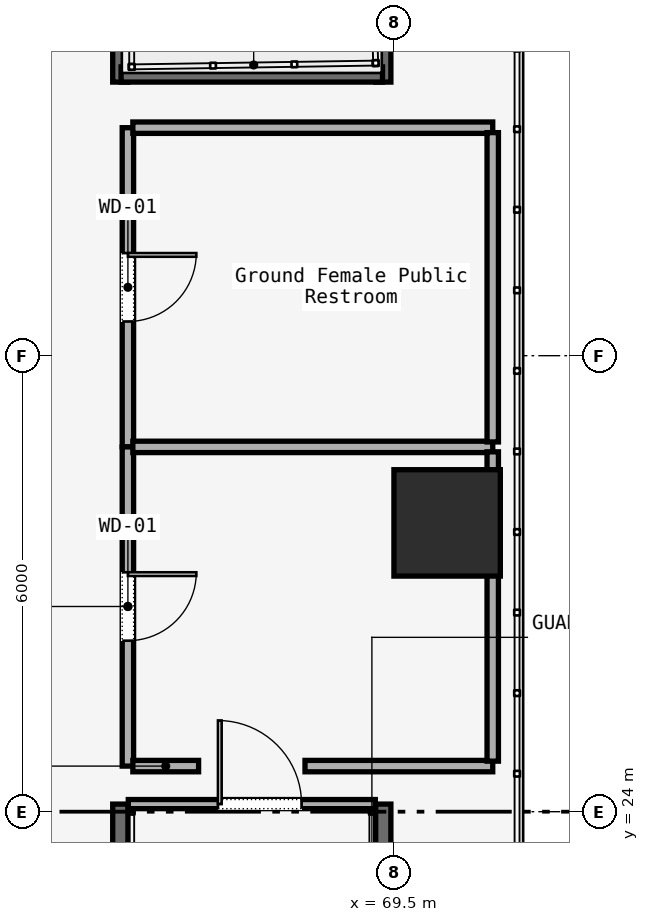
"""IFC4 building model, lengths in metres.
Left out: names, types, materials, properties, quantities, classifications, styles, units other than length and angle.
Written with IfcOpenShell. Run it as: python <this file> out.ifc"""

import sys

from ifc_helpers import new_model, si_unit, direction, frame, frame_2d, origin, origin_2d, place, context, subcontext, project, spatial, rectangle, extrude, element, fill, save


model = new_model("IFC4")
c1 = context("Model", 3, precision=1e-05, world=origin(), true_north=direction((0.0, 1.0)))
c2 = subcontext(c1, "Body", "Model", "MODEL_VIEW")
j1 = project(units=[si_unit("LENGTHUNIT", "METRE"), si_unit("PLANEANGLEUNIT", "RADIAN")], contexts=[c1])
p1 = place(None, origin())
s1 = spatial("IfcSite", under=j1, at=p1, CompositionType="ELEMENT")
p2 = place(p1, origin())
s2 = spatial("IfcBuilding", under=s1, at=p2, CompositionType="ELEMENT")
p3 = place(p2, origin())
s3 = spatial("IfcBuildingStorey", under=s2, at=p3, CompositionType="ELEMENT", Elevation=0.0)
p4 = place(p3, frame((70.2, 27.8, 0.0), z_axis=(0.0, 0.0, 1.0), x_axis=(1.0, 0.0, 0.0)))
e1 = element("IfcColumn", 1, at=p4, inside=s3, PredefinedType="COLUMN", context=c2, shape_type="SweptSolid", body=[
    extrude(rectangle(XDim=1.4, YDim=1.4, at=origin_2d()), origin(), (0.0, 0.0, 1.0), 5.7),
])
for number, where, z_axis, x_axis in (
    (2, (65.9, 24.1, -0.4), (0.0, 0.0, 1.0), (0.0, -1.0, 0.0)),
    (3, (69.36, 24.1, -0.4), (0.0, 0.0, 1.0), (0.0, -1.0, 0.0)),
):
    element("IfcWall", number, at=place(p3, frame(where, z_axis=z_axis, x_axis=x_axis)), inside=s3, PredefinedType="SOLIDWALL", context=c2, shape_type="SweptSolid", body=[
        extrude(rectangle(XDim=7.7, YDim=0.2, at=frame_2d((3.85, 0.0))), origin(), (0.0, 0.0, 1.0), 6.4),
    ])
p5 = place(p3, frame((66.005, 24.1, 0.0), z_axis=(0.0, 0.0, 1.0), x_axis=(1.0, 0.0, 0.0)))
e4 = element("IfcWall", 4, at=p5, inside=s3, PredefinedType="SOLIDWALL", context=c2, shape_type="SweptSolid", body=[
    extrude(rectangle(XDim=3.25, YDim=0.12, at=frame_2d((1.625, 0.0))), origin(), (0.0, 0.0, 1.0), 3.6),
])
p6 = place(p5, frame((1.18, 0.0, 0.0)))
e5 = element("IfcOpeningElement", 5, at=p6, cuts=e4, PredefinedType="OPENING", context=c2, shape_type="SweptSolid", body=[
    extrude(rectangle(XDim=1.1, YDim=2.2, at=frame_2d((0.55, 1.1))), frame((0.0, 0.06, 0.0), z_axis=(0.0, -1.0, 0.0), x_axis=(1.0, 0.0, 0.0)), (0.0, 0.0, 1.0), 0.12),
])
for number, where, z_axis, x_axis in (
    (6, (65.9, 41.3, -0.4), (0.0, 0.0, 1.0), (0.0, -1.0, 0.0)),
    (7, (69.36, 41.3, -0.4), (0.0, 0.0, 1.0), (0.0, -1.0, 0.0)),
):
    element("IfcWall", number, at=place(p3, frame(where, z_axis=z_axis, x_axis=x_axis)), inside=s3, PredefinedType="SOLIDWALL", context=c2, shape_type="SweptSolid", body=[
        extrude(rectangle(XDim=7.7, YDim=0.2, at=frame_2d((3.85, 0.0))), origin(), (0.0, 0.0, 1.0), 6.4),
    ])
p7 = place(p3, frame((65.91, 33.7, -0.4), z_axis=(0.0, 0.0, 1.0), x_axis=(1.0, 0.0, 0.0)))
e8 = element("IfcWall", 8, at=p7, inside=s3, PredefinedType="SOLIDWALL", context=c2, shape_type="SweptSolid", body=[
    extrude(rectangle(XDim=3.44, YDim=0.2, at=frame_2d((1.72, 0.0))), origin(), (0.0, 0.0, 1.0), 6.4),
])
p8 = place(p3, frame((66.0, 33.0, 0.0), z_axis=(0.0, 0.0, 1.0), x_axis=(0.0, -1.0, 0.0)))
e9 = element("IfcWall", 9, at=p8, inside=s3, PredefinedType="PARTITIONING", context=c2, shape_type="SweptSolid", body=[
    extrude(rectangle(XDim=4.2, YDim=0.15, at=frame_2d((2.1, 0.0))), origin(), (0.0, 0.0, 1.0), 3.6),
])
p9 = place(p8, frame((1.65, 0.0, 0.0)))
e10 = element("IfcOpeningElement", 10, at=p9, cuts=e9, PredefinedType="OPENING", context=c2, shape_type="SweptSolid", body=[
    extrude(rectangle(XDim=0.9, YDim=2.15, at=frame_2d((0.45, 1.075))), frame((0.0, 0.075, 0.0), z_axis=(0.0, -1.0, 0.0), x_axis=(1.0, 0.0, 0.0)), (0.0, 0.0, 1.0), 0.15),
])
p10 = place(p3, frame((66.0, 28.8, 0.0), z_axis=(0.0, 0.0, 1.0), x_axis=(0.0, -1.0, 0.0)))
e11 = element("IfcWall", 11, at=p10, inside=s3, PredefinedType="PARTITIONING", context=c2, shape_type="SweptSolid", body=[
    extrude(rectangle(XDim=4.2, YDim=0.15, at=frame_2d((2.1, 0.0))), origin(), (0.0, 0.0, 1.0), 3.6),
])
p11 = place(p10, frame((1.65, 0.0, 0.0)))
e12 = element("IfcOpeningElement", 12, at=p11, cuts=e11, PredefinedType="OPENING", context=c2, shape_type="SweptSolid", body=[
    extrude(rectangle(XDim=0.9, YDim=2.15, at=frame_2d((0.45, 1.075))), frame((0.0, 0.075, 0.0), z_axis=(0.0, -1.0, 0.0), x_axis=(1.0, 0.0, 0.0)), (0.0, 0.0, 1.0), 0.15),
])
p12 = place(p3, frame((70.8, 24.6, 0.0), z_axis=(0.0, 0.0, 1.0), x_axis=(-1.0, 0.0, 0.0)))
e13 = element("IfcWall", 13, at=p12, inside=s3, PredefinedType="PARTITIONING", context=c2, shape_type="SweptSolid", body=[
    extrude(rectangle(XDim=2.47, YDim=0.15, at=frame_2d((1.235, 0.0))), origin(), (0.0, 0.0, 1.0), 3.6),
])
p13 = place(p3, frame((66.93, 24.6, 0.0), z_axis=(0.0, 0.0, 1.0), x_axis=(-1.0, 0.0, 0.0)))
e14 = element("IfcWall", 14, at=p13, inside=s3, PredefinedType="PARTITIONING", context=c2, shape_type="SweptSolid", body=[
    extrude(rectangle(XDim=0.865, YDim=0.15, at=frame_2d((0.433, 0.0))), origin(), (0.0, 0.0, 1.0), 3.6),
])
p14 = place(p3, frame((66.065, 28.8, 0.0), z_axis=(0.0, 0.0, 1.0), x_axis=(1.0, 0.0, 0.0)))
e15 = element("IfcWall", 15, at=p14, inside=s3, PredefinedType="PARTITIONING", context=c2, shape_type="SweptSolid", body=[
    extrude(rectangle(XDim=4.735, YDim=0.15, at=frame_2d((2.368, 0.0))), origin(), (0.0, 0.0, 1.0), 3.6),
])
p15 = place(p3, frame((70.8, 28.735, 0.0), z_axis=(0.0, 0.0, 1.0), x_axis=(0.0, -1.0, 0.0)))
e16 = element("IfcWall", 16, at=p15, inside=s3, PredefinedType="PARTITIONING", context=c2, shape_type="SweptSolid", body=[
    extrude(rectangle(XDim=4.07, YDim=0.15, at=frame_2d((2.035, 0.0))), origin(), (0.0, 0.0, 1.0), 3.6),
])
p16 = place(p3, frame((66.065, 33.0, 0.0), z_axis=(0.0, 0.0, 1.0), x_axis=(1.0, 0.0, 0.0)))
e17 = element("IfcWall", 17, at=p16, inside=s3, PredefinedType="PARTITIONING", context=c2, shape_type="SweptSolid", body=[
    extrude(rectangle(XDim=4.735, YDim=0.15, at=frame_2d((2.368, 0.0))), origin(), (0.0, 0.0, 1.0), 3.6),
])
p17 = place(p3, frame((70.8, 32.935, 0.0), z_axis=(0.0, 0.0, 1.0), x_axis=(0.0, -1.0, 0.0)))
e18 = element("IfcWall", 18, at=p17, inside=s3, PredefinedType="PARTITIONING", context=c2, shape_type="SweptSolid", body=[
    extrude(rectangle(XDim=4.07, YDim=0.15, at=frame_2d((2.035, 0.0))), origin(), (0.0, 0.0, 1.0), 3.6),
])
p18 = place(p6, origin())
e19 = element("IfcDoor", 19, at=p18, inside=s3, OperationType="SINGLE_SWING_LEFT", PredefinedType="DOOR", context=c2, shape_type="SweptSolid", body=[
    extrude(rectangle(XDim=1.1, YDim=2.2, at=frame_2d((0.55, 1.1))), frame((0.0, 0.025, 0.0), z_axis=(0.0, -1.0, 0.0), x_axis=(1.0, 0.0, 0.0)), (0.0, 0.0, 1.0), 0.05),
])
fill(e5, e19)
p19 = place(p11, origin())
e20 = element("IfcDoor", 20, at=p19, inside=s3, OperationType="SINGLE_SWING_RIGHT", PredefinedType="DOOR", context=c2, shape_type="SweptSolid", body=[
    extrude(rectangle(XDim=0.9, YDim=2.15, at=frame_2d((0.45, 1.075))), frame((0.0, 0.025, 0.0), z_axis=(0.0, -1.0, 0.0), x_axis=(1.0, 0.0, 0.0)), (0.0, 0.0, 1.0), 0.05),
])
fill(e12, e20)
p20 = place(p9, origin())
e21 = element("IfcDoor", 21, at=p20, inside=s3, OperationType="SINGLE_SWING_LEFT", PredefinedType="DOOR", context=c2, shape_type="SweptSolid", body=[
    extrude(rectangle(XDim=0.9, YDim=2.15, at=frame_2d((0.45, 1.075))), frame((0.0, 0.025, 0.0), z_axis=(0.0, -1.0, 0.0), x_axis=(1.0, 0.0, 0.0)), (0.0, 0.0, 1.0), 0.05),
])
fill(e10, e21)
save(model, sys.argv[1])
